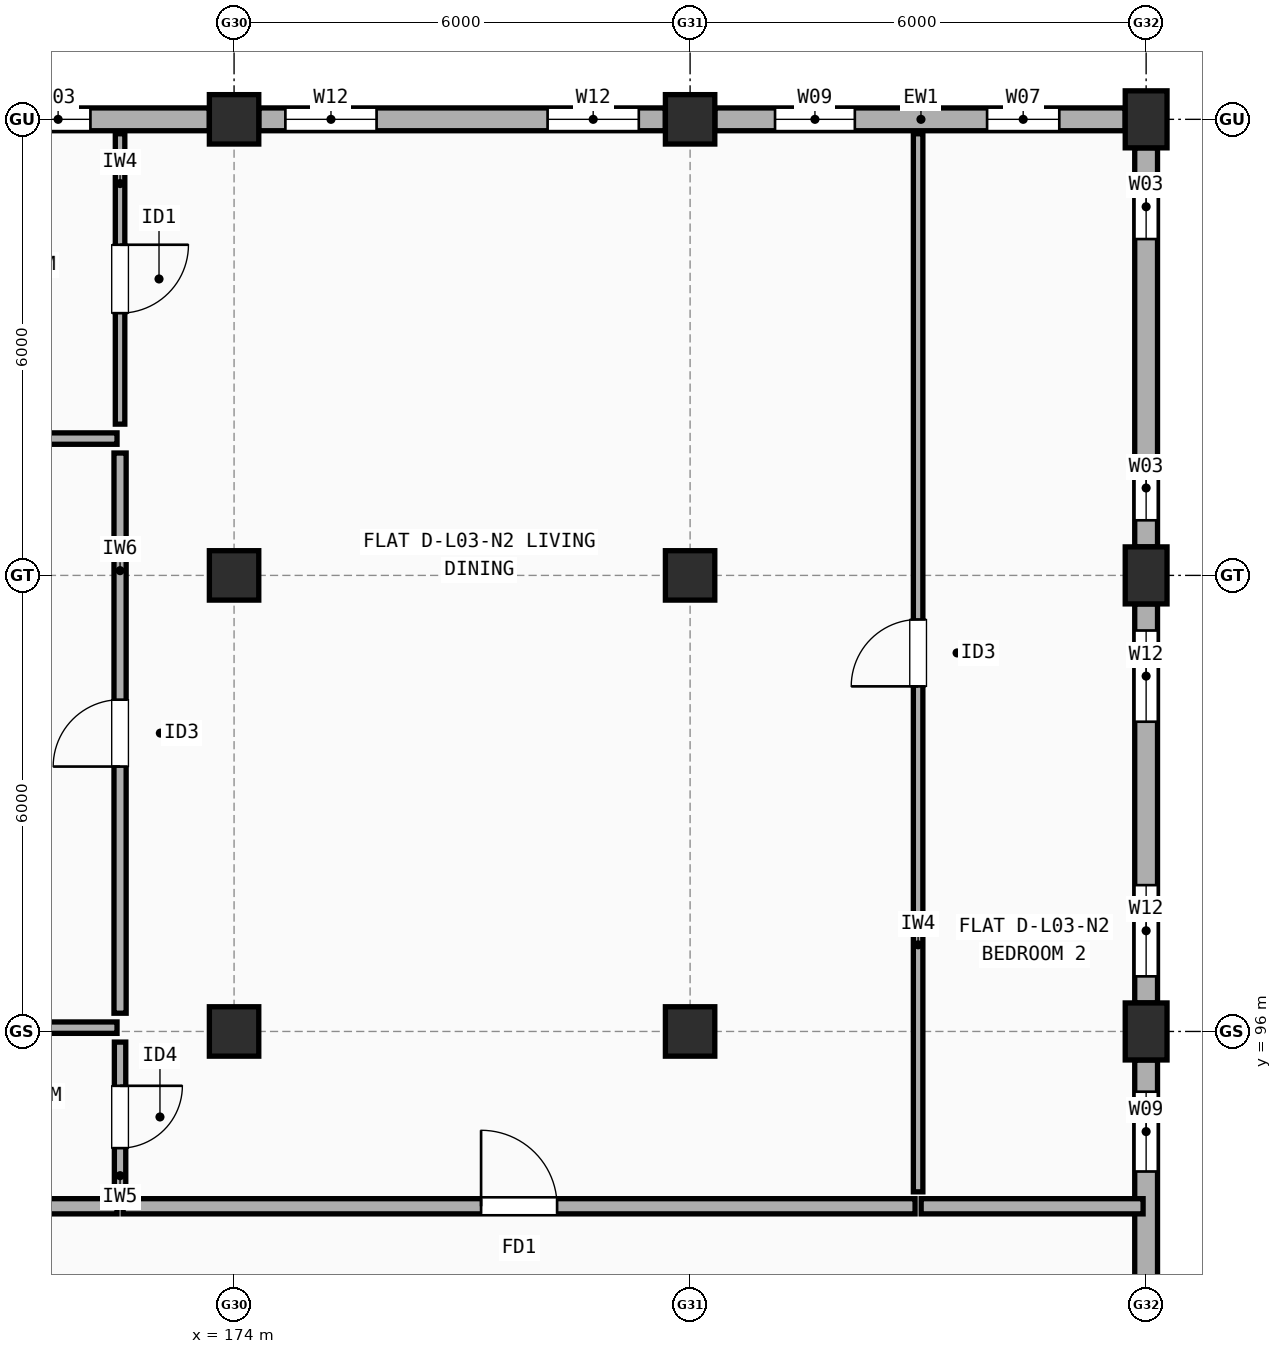
"""IFC4 building model, lengths in metres.
Left out: names, types, materials, properties, quantities, classifications, styles, units other than length and angle.
Written with IfcOpenShell. Run it as: python <this file> out.ifc"""

import sys

from ifc_helpers import new_model, si_unit, direction, frame, frame_2d, origin, origin_2d, place, context, subcontext, project, spatial, rectangle, extrude, element, fill, save


model = new_model("IFC4")
c1 = context("Model", 3, precision=1e-05, world=origin(), true_north=direction((0.0, 1.0)))
c2 = subcontext(c1, "Body", "Model", "MODEL_VIEW")
j1 = project(units=[si_unit("LENGTHUNIT", "METRE"), si_unit("PLANEANGLEUNIT", "RADIAN")], contexts=[c1])
p1 = place(None, origin())
s1 = spatial("IfcSite", under=j1, at=p1, CompositionType="ELEMENT")
p2 = place(p1, origin())
s2 = spatial("IfcBuilding", under=s1, at=p2, CompositionType="ELEMENT")
p3 = place(p2, frame((0.0, 0.0, 10.9)))
s3 = spatial("IfcBuildingStorey", under=s2, at=p3, CompositionType="ELEMENT", Elevation=10.9)
for number, where, z_axis, x_axis in (
    (1, (174.0, 96.0, 0.0), (0.0, 0.0, 1.0), (1.0, 0.0, 0.0)),
    (2, (174.0, 102.0, 0.0), (0.0, 0.0, 1.0), (1.0, 0.0, 0.0)),
    (3, (174.0, 108.0, 0.0), (0.0, 0.0, 1.0), (1.0, 0.0, 0.0)),
    (4, (180.0, 96.0, 0.0), (0.0, 0.0, 1.0), (1.0, 0.0, 0.0)),
    (5, (180.0, 102.0, 0.0), (0.0, 0.0, 1.0), (1.0, 0.0, 0.0)),
    (6, (180.0, 108.0, 0.0), (0.0, 0.0, 1.0), (1.0, 0.0, 0.0)),
):
    element("IfcColumn", number, at=place(p3, frame(where, z_axis=z_axis, x_axis=x_axis)), inside=s3, PredefinedType="COLUMN", context=c2, shape_type="SweptSolid", body=[
        extrude(rectangle(XDim=0.65, YDim=0.65, at=origin_2d()), origin(), (0.0, 0.0, 1.0), 2.96),
    ])
for number, where, z_axis, x_axis in (
    (7, (186.0, 96.0, 0.0), (0.0, 0.0, 1.0), (1.0, 0.0, 0.0)),
    (8, (186.0, 102.0, 0.0), (0.0, 0.0, 1.0), (1.0, 0.0, 0.0)),
    (9, (186.0, 108.0, 0.0), (0.0, 0.0, 1.0), (1.0, 0.0, 0.0)),
):
    element("IfcColumn", number, at=place(p3, frame(where, z_axis=z_axis, x_axis=x_axis)), inside=s3, PredefinedType="COLUMN", context=c2, shape_type="SweptSolid", body=[
        extrude(rectangle(XDim=0.55, YDim=0.75, at=origin_2d()), origin(), (0.0, 0.0, 1.0), 2.96),
    ])
p4 = place(p3, frame((186.0, 90.375, 0.0), z_axis=(0.0, 0.0, 1.0), x_axis=(0.0, 1.0, 0.0)))
e10 = element("IfcWall", 10, at=p4, inside=s3, PredefinedType="STANDARD", context=c2, shape_type="SweptSolid", body=[
    extrude(rectangle(XDim=5.25, YDim=0.3, at=frame_2d((2.625, 0.0))), origin(), (0.0, 0.0, 1.0), 2.442),
])
p5 = place(p4, frame((1.167, 0.0, 0.9)))
e11 = element("IfcOpeningElement", 11, at=p5, cuts=e10, PredefinedType="OPENING", context=c2, shape_type="SweptSolid", body=[
    extrude(rectangle(XDim=0.95, YDim=1.35, at=frame_2d((0.475, 0.675))), frame((0.0, 0.16, 0.0), z_axis=(0.0, -1.0, 0.0), x_axis=(1.0, 0.0, 0.0)), (0.0, 0.0, 1.0), 0.32),
])
p6 = place(p4, frame((3.782, 0.0, 0.9)))
e12 = element("IfcOpeningElement", 12, at=p6, cuts=e10, PredefinedType="OPENING", context=c2, shape_type="SweptSolid", body=[
    extrude(rectangle(XDim=1.05, YDim=1.35, at=frame_2d((0.525, 0.675))), frame((0.0, 0.16, 0.0), z_axis=(0.0, -1.0, 0.0), x_axis=(1.0, 0.0, 0.0)), (0.0, 0.0, 1.0), 0.32),
])
p7 = place(p3, frame((186.0, 96.375, 0.0), z_axis=(0.0, 0.0, 1.0), x_axis=(0.0, 1.0, 0.0)))
e13 = element("IfcWall", 13, at=p7, inside=s3, PredefinedType="STANDARD", context=c2, shape_type="SweptSolid", body=[
    extrude(rectangle(XDim=5.25, YDim=0.3, at=frame_2d((2.625, 0.0))), origin(), (0.0, 0.0, 1.0), 2.442),
])
p8 = place(p7, frame((0.35, 0.0, 0.9)))
e14 = element("IfcOpeningElement", 14, at=p8, cuts=e13, PredefinedType="OPENING", context=c2, shape_type="SweptSolid", body=[
    extrude(rectangle(XDim=1.2, YDim=1.35, at=frame_2d((0.6, 0.675))), frame((0.0, 0.16, 0.0), z_axis=(0.0, -1.0, 0.0), x_axis=(1.0, 0.0, 0.0)), (0.0, 0.0, 1.0), 0.32),
])
p9 = place(p7, frame((3.7, 0.0, 0.9)))
e15 = element("IfcOpeningElement", 15, at=p9, cuts=e13, PredefinedType="OPENING", context=c2, shape_type="SweptSolid", body=[
    extrude(rectangle(XDim=1.2, YDim=1.35, at=frame_2d((0.6, 0.675))), frame((0.0, 0.16, 0.0), z_axis=(0.0, -1.0, 0.0), x_axis=(1.0, 0.0, 0.0)), (0.0, 0.0, 1.0), 0.32),
])
p10 = place(p3, frame((186.0, 102.375, 0.0), z_axis=(0.0, 0.0, 1.0), x_axis=(0.0, 1.0, 0.0)))
e16 = element("IfcWall", 16, at=p10, inside=s3, PredefinedType="STANDARD", context=c2, shape_type="SweptSolid", body=[
    extrude(rectangle(XDim=5.25, YDim=0.3, at=frame_2d((2.625, 0.0))), origin(), (0.0, 0.0, 1.0), 2.442),
])
p11 = place(p10, frame((0.35, 0.0, 0.9)))
e17 = element("IfcOpeningElement", 17, at=p11, cuts=e16, PredefinedType="OPENING", context=c2, shape_type="SweptSolid", body=[
    extrude(rectangle(XDim=0.85, YDim=1.25, at=frame_2d((0.425, 0.625))), frame((0.0, 0.16, 0.0), z_axis=(0.0, -1.0, 0.0), x_axis=(1.0, 0.0, 0.0)), (0.0, 0.0, 1.0), 0.32),
])
p12 = place(p10, frame((4.05, 0.0, 0.9)))
e18 = element("IfcOpeningElement", 18, at=p12, cuts=e16, PredefinedType="OPENING", context=c2, shape_type="SweptSolid", body=[
    extrude(rectangle(XDim=0.85, YDim=1.25, at=frame_2d((0.425, 0.625))), frame((0.0, 0.16, 0.0), z_axis=(0.0, -1.0, 0.0), x_axis=(1.0, 0.0, 0.0)), (0.0, 0.0, 1.0), 0.32),
])
p13 = place(p3, frame((185.725, 108.0, 0.0), z_axis=(0.0, 0.0, 1.0), x_axis=(-1.0, 0.0, 0.0)))
e19 = element("IfcWall", 19, at=p13, inside=s3, PredefinedType="STANDARD", context=c2, shape_type="SweptSolid", body=[
    extrude(rectangle(XDim=5.4, YDim=0.3, at=frame_2d((2.7, 0.0))), origin(), (0.0, 0.0, 1.0), 2.442),
])
p14 = place(p13, frame((0.867, 0.0, 0.9)))
e20 = element("IfcOpeningElement", 20, at=p14, cuts=e19, PredefinedType="OPENING", context=c2, shape_type="SweptSolid", body=[
    extrude(rectangle(XDim=0.95, YDim=1.35, at=frame_2d((0.475, 0.675))), frame((0.0, 0.16, 0.0), z_axis=(0.0, -1.0, 0.0), x_axis=(1.0, 0.0, 0.0)), (0.0, 0.0, 1.0), 0.32),
])
p15 = place(p13, frame((3.558, 0.0, 0.9)))
e21 = element("IfcOpeningElement", 21, at=p15, cuts=e19, PredefinedType="OPENING", context=c2, shape_type="SweptSolid", body=[
    extrude(rectangle(XDim=1.05, YDim=1.35, at=frame_2d((0.525, 0.675))), frame((0.0, 0.16, 0.0), z_axis=(0.0, -1.0, 0.0), x_axis=(1.0, 0.0, 0.0)), (0.0, 0.0, 1.0), 0.32),
])
p16 = place(p3, frame((179.675, 108.0, 0.0), z_axis=(0.0, 0.0, 1.0), x_axis=(-1.0, 0.0, 0.0)))
e22 = element("IfcWall", 22, at=p16, inside=s3, PredefinedType="STANDARD", context=c2, shape_type="SweptSolid", body=[
    extrude(rectangle(XDim=5.35, YDim=0.3, at=frame_2d((2.675, 0.0))), origin(), (0.0, 0.0, 1.0), 2.442),
])
p17 = place(p16, frame((0.35, 0.0, 0.9)))
e23 = element("IfcOpeningElement", 23, at=p17, cuts=e22, PredefinedType="OPENING", context=c2, shape_type="SweptSolid", body=[
    extrude(rectangle(XDim=1.2, YDim=1.35, at=frame_2d((0.6, 0.675))), frame((0.0, 0.16, 0.0), z_axis=(0.0, -1.0, 0.0), x_axis=(1.0, 0.0, 0.0)), (0.0, 0.0, 1.0), 0.32),
])
p18 = place(p16, frame((3.8, 0.0, 0.9)))
e24 = element("IfcOpeningElement", 24, at=p18, cuts=e22, PredefinedType="OPENING", context=c2, shape_type="SweptSolid", body=[
    extrude(rectangle(XDim=1.2, YDim=1.35, at=frame_2d((0.6, 0.675))), frame((0.0, 0.16, 0.0), z_axis=(0.0, -1.0, 0.0), x_axis=(1.0, 0.0, 0.0)), (0.0, 0.0, 1.0), 0.32),
])
p19 = place(p3, frame((173.675, 108.0, 0.0), z_axis=(0.0, 0.0, 1.0), x_axis=(-1.0, 0.0, 0.0)))
e25 = element("IfcWall", 25, at=p19, inside=s3, PredefinedType="STANDARD", context=c2, shape_type="SweptSolid", body=[
    extrude(rectangle(XDim=5.35, YDim=0.3, at=frame_2d((2.675, 0.0))), origin(), (0.0, 0.0, 1.0), 2.442),
])
p20 = place(p19, frame((1.565, 0.0, 0.9)))
e26 = element("IfcOpeningElement", 26, at=p20, cuts=e25, PredefinedType="OPENING", context=c2, shape_type="SweptSolid", body=[
    extrude(rectangle(XDim=0.85, YDim=1.25, at=frame_2d((0.425, 0.625))), frame((0.0, 0.16, 0.0), z_axis=(0.0, -1.0, 0.0), x_axis=(1.0, 0.0, 0.0)), (0.0, 0.0, 1.0), 0.32),
])
p21 = place(p19, frame((4.15, 0.0, 0.9)))
e27 = element("IfcOpeningElement", 27, at=p21, cuts=e25, PredefinedType="OPENING", context=c2, shape_type="SweptSolid", body=[
    extrude(rectangle(XDim=0.85, YDim=1.25, at=frame_2d((0.425, 0.625))), frame((0.0, 0.16, 0.0), z_axis=(0.0, -1.0, 0.0), x_axis=(1.0, 0.0, 0.0)), (0.0, 0.0, 1.0), 0.32),
])
p22 = place(p3, frame((168.04, 93.7, 0.0), z_axis=(0.0, 0.0, 1.0), x_axis=(1.0, 0.0, 0.0)))
e28 = element("IfcWall", 28, at=p22, inside=s3, PredefinedType="SOLIDWALL", context=c2, shape_type="SweptSolid", body=[
    extrude(rectangle(XDim=4.42, YDim=0.2, at=frame_2d((2.21, 0.0))), origin(), (0.0, 0.0, 1.0), 2.508),
])
p23 = place(p3, frame((172.54, 93.7, 0.0), z_axis=(0.0, 0.0, 1.0), x_axis=(1.0, 0.0, 0.0)))
e29 = element("IfcWall", 29, at=p23, inside=s3, PredefinedType="SOLIDWALL", context=c2, shape_type="SweptSolid", body=[
    extrude(rectangle(XDim=10.42, YDim=0.2, at=frame_2d((5.21, 0.0))), origin(), (0.0, 0.0, 1.0), 2.96),
])
p24 = place(p23, frame((4.71, 0.0, 0.0)))
e30 = element("IfcOpeningElement", 30, at=p24, cuts=e29, PredefinedType="OPENING", context=c2, shape_type="SweptSolid", body=[
    extrude(rectangle(XDim=1.0, YDim=2.15, at=frame_2d((0.5, 1.075))), frame((0.0, 0.11, 0.0), z_axis=(0.0, -1.0, 0.0), x_axis=(1.0, 0.0, 0.0)), (0.0, 0.0, 1.0), 0.22),
])
p25 = place(p3, frame((172.5, 103.99, 0.0), z_axis=(0.0, 0.0, 1.0), x_axis=(0.0, 1.0, 0.0)))
e31 = element("IfcWall", 31, at=p25, inside=s3, PredefinedType="PARTITIONING", context=c2, shape_type="SweptSolid", body=[
    extrude(rectangle(XDim=3.82, YDim=0.125, at=frame_2d((1.91, 0.0))), origin(), (0.0, 0.0, 1.0), 2.96),
])
p26 = place(p25, frame((1.46, 0.0, 0.0)))
e32 = element("IfcOpeningElement", 32, at=p26, cuts=e31, PredefinedType="OPENING", context=c2, shape_type="SweptSolid", body=[
    extrude(rectangle(XDim=0.9, YDim=2.1, at=frame_2d((0.45, 1.05))), frame((0.0, 0.073, 0.0), z_axis=(0.0, -1.0, 0.0), x_axis=(1.0, 0.0, 0.0)), (0.0, 0.0, 1.0), 0.145),
])
p27 = place(p3, frame((172.5, 96.24, 0.0), z_axis=(0.0, 0.0, 1.0), x_axis=(0.0, 1.0, 0.0)))
e33 = element("IfcWall", 33, at=p27, inside=s3, PredefinedType="PLUMBINGWALL", context=c2, shape_type="SweptSolid", body=[
    extrude(rectangle(XDim=7.37, YDim=0.16, at=frame_2d((3.685, 0.0))), origin(), (0.0, 0.0, 1.0), 2.442),
])
p28 = place(p27, frame((3.245, 0.0, 0.0)))
e34 = element("IfcOpeningElement", 34, at=p28, cuts=e33, PredefinedType="OPENING", context=c2, shape_type="SweptSolid", body=[
    extrude(rectangle(XDim=0.88, YDim=2.1, at=frame_2d((0.44, 1.05))), frame((0.0, 0.09, 0.0), z_axis=(0.0, -1.0, 0.0), x_axis=(1.0, 0.0, 0.0)), (0.0, 0.0, 1.0), 0.18),
])
p29 = place(p3, frame((172.5, 93.89, 0.0), z_axis=(0.0, 0.0, 1.0), x_axis=(0.0, 1.0, 0.0)))
e35 = element("IfcWall", 35, at=p29, inside=s3, PredefinedType="PARTITIONING", context=c2, shape_type="SweptSolid", body=[
    extrude(rectangle(XDim=1.97, YDim=0.15, at=frame_2d((0.985, 0.0))), origin(), (0.0, 0.0, 1.0), 2.96),
])
p30 = place(p29, frame((0.575, 0.0, 0.0)))
e36 = element("IfcOpeningElement", 36, at=p30, cuts=e35, PredefinedType="OPENING", context=c2, shape_type="SweptSolid", body=[
    extrude(rectangle(XDim=0.82, YDim=2.08, at=frame_2d((0.41, 1.04))), frame((0.0, 0.085, 0.0), z_axis=(0.0, -1.0, 0.0), x_axis=(1.0, 0.0, 0.0)), (0.0, 0.0, 1.0), 0.17),
])
p31 = place(p3, frame((168.04, 103.8, 0.0), z_axis=(0.0, 0.0, 1.0), x_axis=(1.0, 0.0, 0.0)))
e37 = element("IfcWall", 37, at=p31, inside=s3, PredefinedType="PARTITIONING", context=c2, shape_type="SweptSolid", body=[
    extrude(rectangle(XDim=4.42, YDim=0.15, at=frame_2d((2.21, 0.0))), origin(), (0.0, 0.0, 1.0), 2.458),
])
p32 = place(p3, frame((168.36, 96.05, 0.0), z_axis=(0.0, 0.0, 1.0), x_axis=(1.0, 0.0, 0.0)))
e38 = element("IfcWall", 38, at=p32, inside=s3, PredefinedType="PARTITIONING", context=c2, shape_type="SweptSolid", body=[
    extrude(rectangle(XDim=4.1, YDim=0.15, at=frame_2d((2.05, 0.0))), origin(), (0.0, 0.0, 1.0), 2.548),
])
p33 = place(p3, frame((183.04, 93.7, 0.0), z_axis=(0.0, 0.0, 1.0), x_axis=(1.0, 0.0, 0.0)))
e39 = element("IfcWall", 39, at=p33, inside=s3, PredefinedType="SOLIDWALL", context=c2, shape_type="SweptSolid", body=[
    extrude(rectangle(XDim=2.92, YDim=0.2, at=frame_2d((1.46, 0.0))), origin(), (0.0, 0.0, 1.0), 2.442),
])
p34 = place(p3, frame((183.0, 93.89, 0.0), z_axis=(0.0, 0.0, 1.0), x_axis=(0.0, 1.0, 0.0)))
e40 = element("IfcWall", 40, at=p34, inside=s3, PredefinedType="PARTITIONING", context=c2, shape_type="SweptSolid", body=[
    extrude(rectangle(XDim=13.92, YDim=0.125, at=frame_2d((6.96, 0.0))), origin(), (0.0, 0.0, 1.0), 2.408),
])
p35 = place(p34, frame((6.65, 0.0, 0.0)))
e41 = element("IfcOpeningElement", 41, at=p35, cuts=e40, PredefinedType="OPENING", context=c2, shape_type="SweptSolid", body=[
    extrude(rectangle(XDim=0.88, YDim=2.1, at=frame_2d((0.44, 1.05))), frame((0.0, 0.073, 0.0), z_axis=(0.0, -1.0, 0.0), x_axis=(1.0, 0.0, 0.0)), (0.0, 0.0, 1.0), 0.145),
])
p36 = place(p6, origin())
e42 = element("IfcWindow", 42, at=p36, inside=s3, PartitioningType="SINGLE_PANEL", PredefinedType="WINDOW", context=c2, shape_type="SweptSolid", body=[
    extrude(rectangle(XDim=1.05, YDim=1.35, at=frame_2d((0.525, 0.675))), frame((0.0, 0.03, 0.0), z_axis=(0.0, -1.0, 0.0), x_axis=(1.0, 0.0, 0.0)), (0.0, 0.0, 1.0), 0.06),
])
fill(e12, e42)
p37 = place(p8, origin())
e43 = element("IfcWindow", 43, at=p37, inside=s3, PartitioningType="SINGLE_PANEL", PredefinedType="WINDOW", context=c2, shape_type="SweptSolid", body=[
    extrude(rectangle(XDim=1.2, YDim=1.35, at=frame_2d((0.6, 0.675))), frame((0.0, 0.03, 0.0), z_axis=(0.0, -1.0, 0.0), x_axis=(1.0, 0.0, 0.0)), (0.0, 0.0, 1.0), 0.06),
])
fill(e14, e43)
p38 = place(p9, origin())
e44 = element("IfcWindow", 44, at=p38, inside=s3, PartitioningType="SINGLE_PANEL", PredefinedType="WINDOW", context=c2, shape_type="SweptSolid", body=[
    extrude(rectangle(XDim=1.2, YDim=1.35, at=frame_2d((0.6, 0.675))), frame((0.0, 0.03, 0.0), z_axis=(0.0, -1.0, 0.0), x_axis=(1.0, 0.0, 0.0)), (0.0, 0.0, 1.0), 0.06),
])
fill(e15, e44)
p39 = place(p11, origin())
e45 = element("IfcWindow", 45, at=p39, inside=s3, PartitioningType="SINGLE_PANEL", PredefinedType="WINDOW", context=c2, shape_type="SweptSolid", body=[
    extrude(rectangle(XDim=0.85, YDim=1.25, at=frame_2d((0.425, 0.625))), frame((0.0, 0.03, 0.0), z_axis=(0.0, -1.0, 0.0), x_axis=(1.0, 0.0, 0.0)), (0.0, 0.0, 1.0), 0.06),
])
fill(e17, e45)
p40 = place(p12, origin())
e46 = element("IfcWindow", 46, at=p40, inside=s3, PartitioningType="SINGLE_PANEL", PredefinedType="WINDOW", context=c2, shape_type="SweptSolid", body=[
    extrude(rectangle(XDim=0.85, YDim=1.25, at=frame_2d((0.425, 0.625))), frame((0.0, 0.03, 0.0), z_axis=(0.0, -1.0, 0.0), x_axis=(1.0, 0.0, 0.0)), (0.0, 0.0, 1.0), 0.06),
])
fill(e18, e46)
p41 = place(p14, origin())
e47 = element("IfcWindow", 47, at=p41, inside=s3, PartitioningType="SINGLE_PANEL", PredefinedType="WINDOW", context=c2, shape_type="SweptSolid", body=[
    extrude(rectangle(XDim=0.95, YDim=1.35, at=frame_2d((0.475, 0.675))), frame((0.0, 0.03, 0.0), z_axis=(0.0, -1.0, 0.0), x_axis=(1.0, 0.0, 0.0)), (0.0, 0.0, 1.0), 0.06),
])
fill(e20, e47)
p42 = place(p15, origin())
e48 = element("IfcWindow", 48, at=p42, inside=s3, PartitioningType="SINGLE_PANEL", PredefinedType="WINDOW", context=c2, shape_type="SweptSolid", body=[
    extrude(rectangle(XDim=1.05, YDim=1.35, at=frame_2d((0.525, 0.675))), frame((0.0, 0.03, 0.0), z_axis=(0.0, -1.0, 0.0), x_axis=(1.0, 0.0, 0.0)), (0.0, 0.0, 1.0), 0.06),
])
fill(e21, e48)
p43 = place(p17, origin())
e49 = element("IfcWindow", 49, at=p43, inside=s3, PartitioningType="SINGLE_PANEL", PredefinedType="WINDOW", context=c2, shape_type="SweptSolid", body=[
    extrude(rectangle(XDim=1.2, YDim=1.35, at=frame_2d((0.6, 0.675))), frame((0.0, 0.03, 0.0), z_axis=(0.0, -1.0, 0.0), x_axis=(1.0, 0.0, 0.0)), (0.0, 0.0, 1.0), 0.06),
])
fill(e23, e49)
p44 = place(p18, origin())
e50 = element("IfcWindow", 50, at=p44, inside=s3, PartitioningType="SINGLE_PANEL", PredefinedType="WINDOW", context=c2, shape_type="SweptSolid", body=[
    extrude(rectangle(XDim=1.2, YDim=1.35, at=frame_2d((0.6, 0.675))), frame((0.0, 0.03, 0.0), z_axis=(0.0, -1.0, 0.0), x_axis=(1.0, 0.0, 0.0)), (0.0, 0.0, 1.0), 0.06),
])
fill(e24, e50)
p45 = place(p20, origin())
e51 = element("IfcWindow", 51, at=p45, inside=s3, PartitioningType="SINGLE_PANEL", PredefinedType="WINDOW", context=c2, shape_type="SweptSolid", body=[
    extrude(rectangle(XDim=0.85, YDim=1.25, at=frame_2d((0.425, 0.625))), frame((0.0, 0.03, 0.0), z_axis=(0.0, -1.0, 0.0), x_axis=(1.0, 0.0, 0.0)), (0.0, 0.0, 1.0), 0.06),
])
fill(e26, e51)
p46 = place(p24, origin())
e52 = element("IfcDoor", 52, at=p46, inside=s3, OperationType="SINGLE_SWING_LEFT", PredefinedType="DOOR", context=c2, shape_type="SweptSolid", body=[
    extrude(rectangle(XDim=1.0, YDim=2.15, at=frame_2d((0.5, 1.075))), frame((0.0, 0.025, 0.0), z_axis=(0.0, -1.0, 0.0), x_axis=(1.0, 0.0, 0.0)), (0.0, 0.0, 1.0), 0.05),
])
fill(e30, e52)
p47 = place(p26, origin())
e53 = element("IfcDoor", 53, at=p47, inside=s3, OperationType="SINGLE_SWING_RIGHT", PredefinedType="DOOR", context=c2, shape_type="SweptSolid", body=[
    extrude(rectangle(XDim=0.9, YDim=2.1, at=frame_2d((0.45, 1.05))), frame((0.0, 0.025, 0.0), z_axis=(0.0, -1.0, 0.0), x_axis=(1.0, 0.0, 0.0)), (0.0, 0.0, 1.0), 0.05),
])
fill(e32, e53)
p48 = place(p28, origin())
e54 = element("IfcDoor", 54, at=p48, inside=s3, OperationType="SINGLE_SWING_LEFT", PredefinedType="DOOR", context=c2, shape_type="SweptSolid", body=[
    extrude(rectangle(XDim=0.88, YDim=2.1, at=frame_2d((0.44, 1.05))), frame((0.0, 0.025, 0.0), z_axis=(0.0, -1.0, 0.0), x_axis=(1.0, 0.0, 0.0)), (0.0, 0.0, 1.0), 0.05),
])
fill(e34, e54)
p49 = place(p30, origin())
e55 = element("IfcDoor", 55, at=p49, inside=s3, OperationType="SINGLE_SWING_RIGHT", PredefinedType="DOOR", context=c2, shape_type="SweptSolid", body=[
    extrude(rectangle(XDim=0.82, YDim=2.08, at=frame_2d((0.41, 1.04))), frame((0.0, 0.025, 0.0), z_axis=(0.0, -1.0, 0.0), x_axis=(1.0, 0.0, 0.0)), (0.0, 0.0, 1.0), 0.05),
])
fill(e36, e55)
p50 = place(p35, origin())
e56 = element("IfcDoor", 56, at=p50, inside=s3, OperationType="SINGLE_SWING_LEFT", PredefinedType="DOOR", context=c2, shape_type="SweptSolid", body=[
    extrude(rectangle(XDim=0.88, YDim=2.1, at=frame_2d((0.44, 1.05))), frame((0.0, 0.025, 0.0), z_axis=(0.0, -1.0, 0.0), x_axis=(1.0, 0.0, 0.0)), (0.0, 0.0, 1.0), 0.05),
])
fill(e41, e56)
save(model, sys.argv[1])
